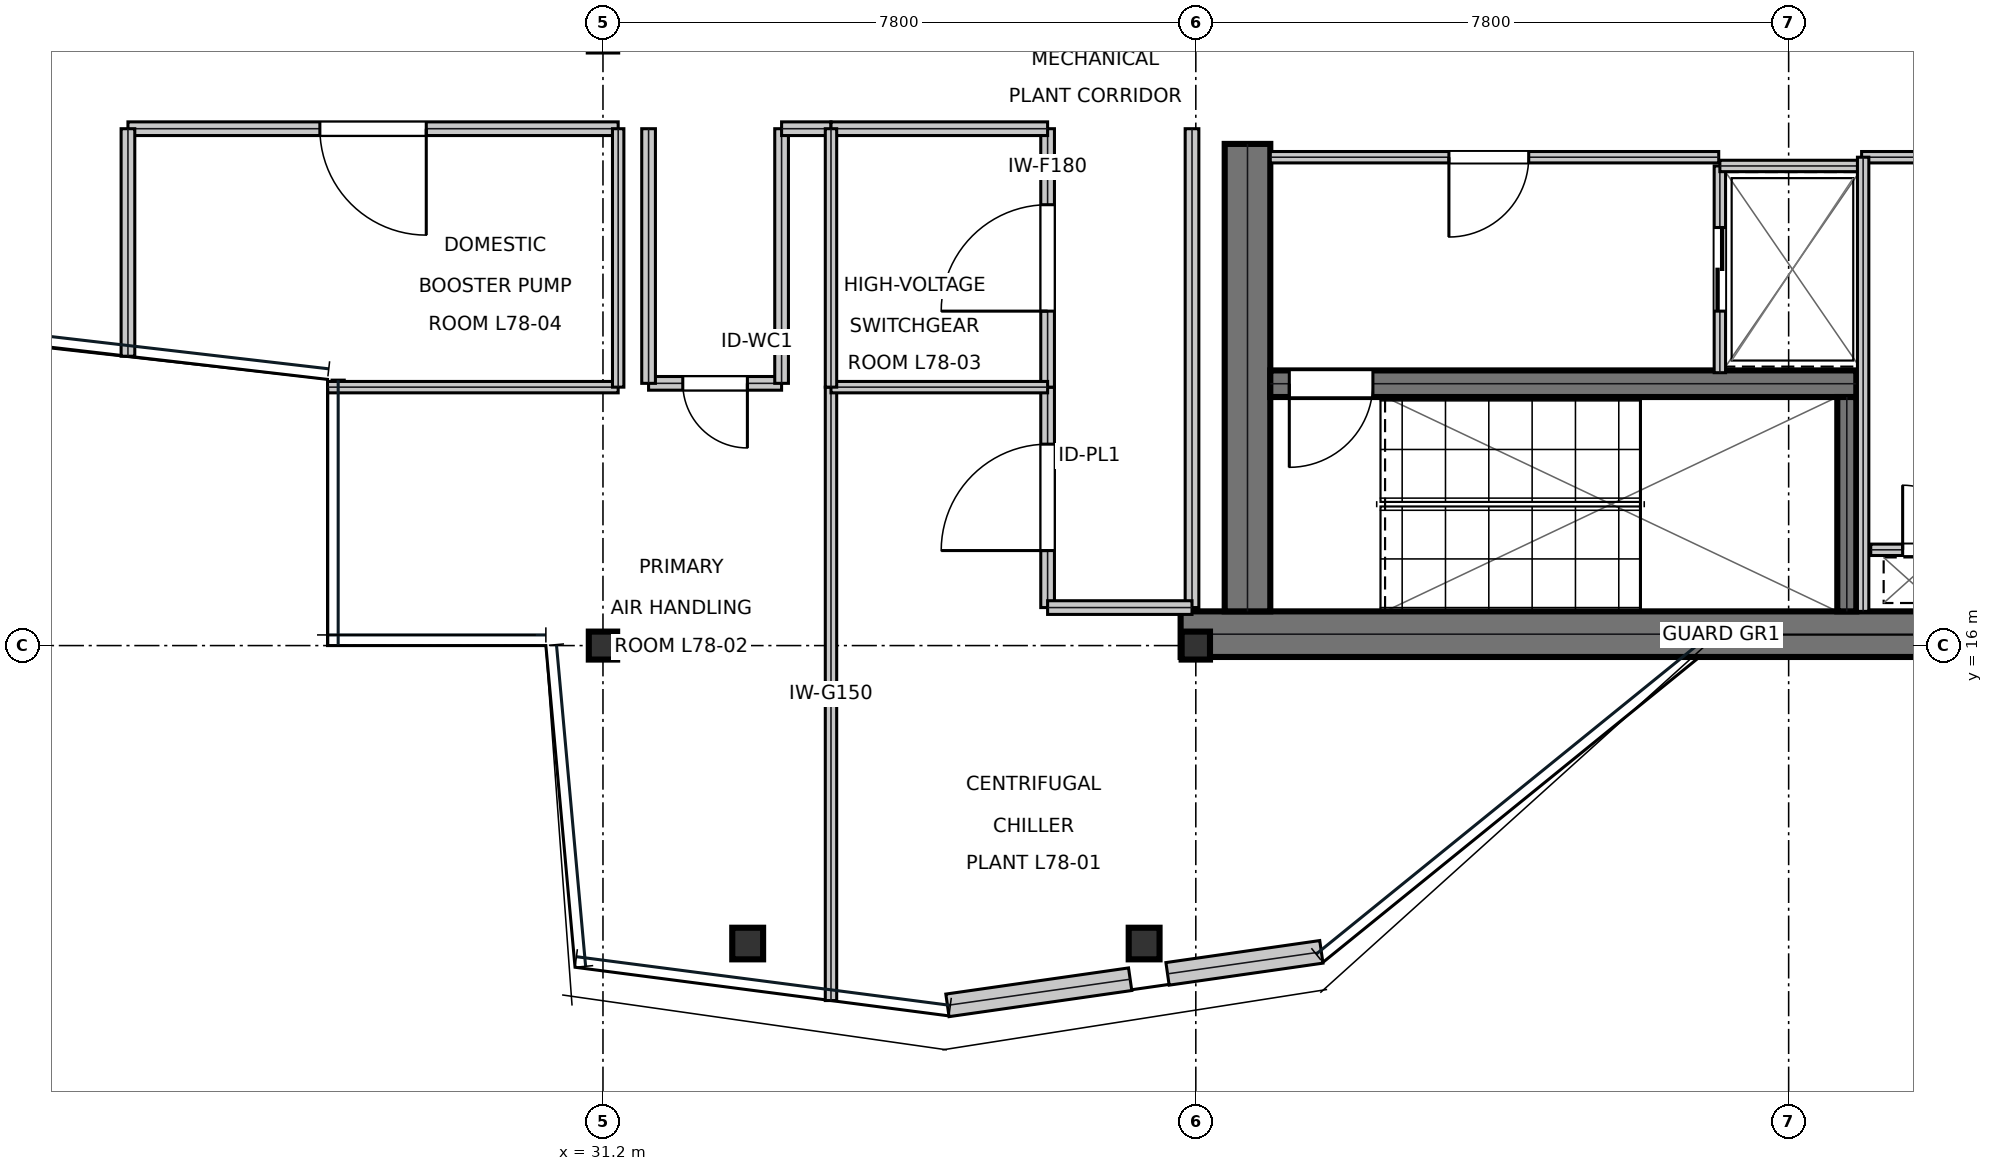
"""IFC4 building model, lengths in metres.
Left out: names, types, materials, properties, quantities, classifications, styles, units other than length and angle.
Written with IfcOpenShell. Run it as: python <this file> out.ifc"""

import sys

from ifc_helpers import new_model, si_unit, direction, frame, frame_2d, origin, origin_2d, place, context, subcontext, project, spatial, rectangle, i_section, extrude, element, fill, save


model = new_model("IFC4")
c1 = context("Model", 3, precision=1e-05, world=origin(), true_north=direction((0.0, 1.0)))
c2 = subcontext(c1, "Body", "Model", "MODEL_VIEW")
j1 = project(units=[si_unit("LENGTHUNIT", "METRE"), si_unit("PLANEANGLEUNIT", "RADIAN")], contexts=[c1])
p1 = place(None, origin())
s1 = spatial("IfcSite", under=j1, at=p1, CompositionType="ELEMENT")
p2 = place(p1, origin())
s2 = spatial("IfcBuilding", under=s1, at=p2, CompositionType="ELEMENT")
p3 = place(p2, frame((0.0, 0.0, 332.4)))
s3 = spatial("IfcBuildingStorey", under=s2, at=p3, CompositionType="ELEMENT", Elevation=332.4)
p4 = place(p3, frame((38.8, 16.15, 0.0), z_axis=(0.0, 0.0, 1.0), x_axis=(1.0, 0.0, 0.0)))
e1 = element("IfcWall", 1, at=p4, inside=s3, PredefinedType="SHEAR", context=c2, shape_type="SweptSolid", body=[
    extrude(rectangle(XDim=16.0, YDim=0.6, at=frame_2d((8.0, 0.0))), origin(), (0.0, 0.0, 1.0), 4.18),
])
p5 = place(p3, frame((39.68, 16.45, 0.0), z_axis=(0.0, 0.0, 1.0), x_axis=(0.0, 1.0, 0.0)))
e2 = element("IfcWall", 2, at=p5, inside=s3, PredefinedType="SHEAR", context=c2, shape_type="SweptSolid", body=[
    extrude(rectangle(XDim=6.15, YDim=0.6, at=frame_2d((3.075, 0.0))), origin(), (0.0, 0.0, 1.0), 4.18),
])
p6 = place(p3, frame((39.98, 19.445, 0.0), z_axis=(0.0, 0.0, 1.0), x_axis=(1.0, 0.0, 0.0)))
e3 = element("IfcWall", 3, at=p6, inside=s3, PredefinedType="SHEAR", context=c2, shape_type="SweptSolid", body=[
    extrude(rectangle(XDim=7.71, YDim=0.35, at=frame_2d((3.855, 0.0))), origin(), (0.0, 0.0, 1.0), 4.18),
])
p7 = place(p6, frame((0.25, 0.0, 0.0)))
e4 = element("IfcOpeningElement", 4, at=p7, cuts=e3, PredefinedType="OPENING", context=c2, shape_type="SweptSolid", body=[
    extrude(rectangle(XDim=1.1, YDim=2.15, at=frame_2d((0.55, 1.075))), frame((0.0, 0.185, 0.0), z_axis=(0.0, -1.0, 0.0), x_axis=(1.0, 0.0, 0.0)), (0.0, 0.0, 1.0), 0.37),
])
p8 = place(p3, frame((47.565, 16.45, 0.0), z_axis=(0.0, 0.0, 1.0), x_axis=(0.0, 1.0, 0.0)))
e5 = element("IfcWall", 5, at=p8, inside=s3, PredefinedType="SHEAR", context=c2, shape_type="SweptSolid", body=[
    extrude(rectangle(XDim=2.82, YDim=0.25, at=frame_2d((1.41, 0.0))), origin(), (0.0, 0.0, 1.0), 4.18),
])
for number, where, z_axis, x_axis in (
    (6, (31.2, 16.0, 0.0), (0.0, 0.0, 1.0), (1.0, 0.0, 0.0)),
    (7, (39.0, 16.0, 0.0), (0.0, 0.0, 1.0), (1.0, 0.0, 0.0)),
):
    element("IfcColumn", number, at=place(p3, frame(where, z_axis=z_axis, x_axis=x_axis)), inside=s3, PredefinedType="COLUMN", context=c2, shape_type="SweptSolid", body=[
        extrude(i_section(OverallWidth=0.373, OverallDepth=0.368, WebThickness=0.015, FlangeThickness=0.024, at=origin_2d()), origin(), (0.0, 0.0, 1.0), 4.494),
    ])
for number, where, z_axis, x_axis in (
    (8, (33.104, 12.08, 0.016), (0.0, 0.0, 1.0), (1.0, 0.0, 0.0)),
    (9, (38.32, 12.08, 0.016), (0.0, 0.0, 1.0), (1.0, 0.0, 0.0)),
):
    element("IfcColumn", number, at=place(p3, frame(where, z_axis=z_axis, x_axis=x_axis)), inside=s3, PredefinedType="COLUMN", context=c2, shape_type="SweptSolid", body=[
        extrude(i_section(OverallWidth=0.406, OverallDepth=0.416, WebThickness=0.03, FlangeThickness=0.048, at=origin_2d()), origin(), (0.0, 0.0, 1.0), 4.468),
    ])
p9 = place(p3, frame((35.732, 11.267, 0.0), z_axis=(0.0, 0.0, 1.0), x_axis=(0.989917298502, 0.141646539412, 0.0)))
e10 = element("IfcWall", 10, at=p9, inside=s3, PredefinedType="STANDARD", context=c2, shape_type="SweptSolid", body=[
    extrude(rectangle(XDim=2.428, YDim=0.3, at=frame_2d((1.214, 0.0))), origin(), (0.0, 0.0, 1.0), 4.18),
])
p10 = place(p3, frame((38.628, 11.681, 0.0), z_axis=(0.0, 0.0, 1.0), x_axis=(0.989904067126, 0.141738978007, 0.0)))
e11 = element("IfcWall", 11, at=p10, inside=s3, PredefinedType="STANDARD", context=c2, shape_type="SweptSolid", body=[
    extrude(rectangle(XDim=2.045, YDim=0.3, at=frame_2d((1.022, 0.0))), origin(), (0.0, 0.0, 1.0), 4.18),
])
p11 = place(p3, frame((39.98, 22.425, 0.0), z_axis=(0.0, 0.0, 1.0), x_axis=(1.0, 0.0, 0.0)))
e12 = element("IfcWall", 12, at=p11, inside=s3, PredefinedType="PARTITIONING", context=c2, shape_type="SweptSolid", body=[
    extrude(rectangle(XDim=5.9, YDim=0.15, at=frame_2d((2.95, 0.0))), origin(), (0.0, 0.0, 1.0), 4.18),
])
p12 = place(p11, frame((2.35, 0.0, 0.0)))
e13 = element("IfcOpeningElement", 13, at=p12, cuts=e12, PredefinedType="OPENING", context=c2, shape_type="SweptSolid", body=[
    extrude(rectangle(XDim=1.05, YDim=2.15, at=frame_2d((0.525, 1.075))), frame((0.0, 0.085, 0.0), z_axis=(0.0, -1.0, 0.0), x_axis=(1.0, 0.0, 0.0)), (0.0, 0.0, 1.0), 0.17),
])
p13 = place(p3, frame((45.895, 19.59, 0.0), z_axis=(0.0, 0.0, 1.0), x_axis=(0.0, 1.0, 0.0)))
e14 = element("IfcWall", 14, at=p13, inside=s3, PredefinedType="PARTITIONING", context=c2, shape_type="SweptSolid", body=[
    extrude(rectangle(XDim=2.72, YDim=0.15, at=frame_2d((1.36, 0.0))), origin(), (0.0, 0.0, 1.0), 4.18),
])
p14 = place(p13, frame((0.81, 0.0, 0.0)))
e15 = element("IfcOpeningElement", 15, at=p14, cuts=e14, PredefinedType="OPENING", context=c2, shape_type="SweptSolid", body=[
    extrude(rectangle(XDim=1.1, YDim=2.15, at=frame_2d((0.55, 1.075))), frame((0.0, 0.085, 0.0), z_axis=(0.0, -1.0, 0.0), x_axis=(1.0, 0.0, 0.0)), (0.0, 0.0, 1.0), 0.17),
])
p15 = place(p3, frame((45.895, 22.31, 0.0), z_axis=(0.0, 0.0, 1.0), x_axis=(1.0, 0.0, 0.0)))
e16 = element("IfcWall", 16, at=p15, inside=s3, PredefinedType="PARTITIONING", context=c2, shape_type="SweptSolid", body=[
    extrude(rectangle(XDim=1.915, YDim=0.15, at=frame_2d((0.958, 0.0))), origin(), (0.0, 0.0, 1.0), 4.18),
])
p16 = place(p3, frame((47.88, 17.26, 0.0), z_axis=(0.0, 0.0, 1.0), x_axis=(1.0, 0.0, 0.0)))
e17 = element("IfcWall", 17, at=p16, inside=s3, PredefinedType="PARTITIONING", context=c2, shape_type="SweptSolid", body=[
    extrude(rectangle(XDim=1.72, YDim=0.15, at=frame_2d((0.86, 0.0))), origin(), (0.0, 0.0, 1.0), 4.18),
])
p17 = place(p16, frame((0.42, 0.0, 0.0)))
e18 = element("IfcOpeningElement", 18, at=p17, cuts=e17, PredefinedType="OPENING", context=c2, shape_type="SweptSolid", body=[
    extrude(rectangle(XDim=0.85, YDim=2.15, at=frame_2d((0.425, 1.075))), frame((0.0, 0.085, 0.0), z_axis=(0.0, -1.0, 0.0), x_axis=(1.0, 0.0, 0.0)), (0.0, 0.0, 1.0), 0.17),
])
p18 = place(p3, frame((47.76, 22.425, 0.0), z_axis=(0.0, 0.0, 1.0), x_axis=(1.0, 0.0, 0.0)))
e19 = element("IfcWall", 19, at=p18, inside=s3, PredefinedType="PARTITIONING", context=c2, shape_type="SweptSolid", body=[
    extrude(rectangle(XDim=1.96, YDim=0.15, at=frame_2d((0.98, 0.0))), origin(), (0.0, 0.0, 1.0), 4.18),
])
p19 = place(p3, frame((47.78, 16.45, 0.0), z_axis=(0.0, 0.0, 1.0), x_axis=(0.0, 1.0, 0.0)))
e20 = element("IfcWall", 20, at=p19, inside=s3, PredefinedType="PARTITIONING", context=c2, shape_type="SweptSolid", body=[
    extrude(rectangle(XDim=5.975, YDim=0.15, at=frame_2d((2.988, 0.0))), origin(), (0.0, 0.0, 1.0), 4.18),
])
p20 = place(p3, frame((37.05, 16.5, 0.0), z_axis=(0.0, 0.0, 1.0), x_axis=(0.0, 1.0, 0.0)))
e21 = element("IfcWall", 21, at=p20, inside=s3, PredefinedType="SOLIDWALL", context=c2, shape_type="SweptSolid", body=[
    extrude(rectangle(XDim=2.9, YDim=0.18, at=frame_2d((1.45, 0.0))), origin(), (0.0, 0.0, 1.0), 3.91),
])
p21 = place(p20, frame((0.75, 0.0, 0.0)))
e22 = element("IfcOpeningElement", 22, at=p21, cuts=e21, PredefinedType="OPENING", context=c2, shape_type="SweptSolid", body=[
    extrude(rectangle(XDim=1.4, YDim=2.2, at=frame_2d((0.7, 1.1))), frame((0.0, 0.1, 0.0), z_axis=(0.0, -1.0, 0.0), x_axis=(1.0, 0.0, 0.0)), (0.0, 0.0, 1.0), 0.2),
])
p22 = place(p3, frame((31.8, 19.45, 0.0), z_axis=(0.0, 0.0, 1.0), x_axis=(1.0, 0.0, 0.0)))
e23 = element("IfcWall", 23, at=p22, inside=s3, PredefinedType="SOLIDWALL", context=c2, shape_type="SweptSolid", body=[
    extrude(rectangle(XDim=1.75, YDim=0.18, at=frame_2d((0.875, 0.0))), origin(), (0.0, 0.0, 1.0), 4.18),
])
p23 = place(p22, frame((0.45, 0.0, 0.0)))
e24 = element("IfcOpeningElement", 24, at=p23, cuts=e23, PredefinedType="OPENING", context=c2, shape_type="SweptSolid", body=[
    extrude(rectangle(XDim=0.85, YDim=2.15, at=frame_2d((0.425, 1.075))), frame((0.0, 0.1, 0.0), z_axis=(0.0, -1.0, 0.0), x_axis=(1.0, 0.0, 0.0)), (0.0, 0.0, 1.0), 0.2),
])
p24 = place(p3, frame((37.05, 19.4, 0.0), z_axis=(0.0, 0.0, 1.0), x_axis=(0.0, 1.0, 0.0)))
e25 = element("IfcWall", 25, at=p24, inside=s3, PredefinedType="SOLIDWALL", context=c2, shape_type="SweptSolid", body=[
    extrude(rectangle(XDim=3.4, YDim=0.18, at=frame_2d((1.7, 0.0))), origin(), (0.0, 0.0, 1.0), 3.91),
])
p25 = place(p24, frame((1.0, 0.0, 0.0)))
e26 = element("IfcOpeningElement", 26, at=p25, cuts=e25, PredefinedType="OPENING", context=c2, shape_type="SweptSolid", body=[
    extrude(rectangle(XDim=1.4, YDim=2.2, at=frame_2d((0.7, 1.1))), frame((0.0, 0.1, 0.0), z_axis=(0.0, -1.0, 0.0), x_axis=(1.0, 0.0, 0.0)), (0.0, 0.0, 1.0), 0.2),
])
p26 = place(p3, frame((24.95, 22.8, 0.0), z_axis=(0.0, 0.0, 1.0), x_axis=(1.0, 0.0, 0.0)))
e27 = element("IfcWall", 27, at=p26, inside=s3, PredefinedType="SOLIDWALL", context=c2, shape_type="SweptSolid", body=[
    extrude(rectangle(XDim=6.45, YDim=0.18, at=frame_2d((3.225, 0.0))), origin(), (0.0, 0.0, 1.0), 3.64),
])
p27 = place(p26, frame((2.525, 0.0, 0.0)))
e28 = element("IfcOpeningElement", 28, at=p27, cuts=e27, PredefinedType="OPENING", context=c2, shape_type="SweptSolid", body=[
    extrude(rectangle(XDim=1.4, YDim=2.2, at=frame_2d((0.7, 1.1))), frame((0.0, 0.1, 0.0), z_axis=(0.0, -1.0, 0.0), x_axis=(1.0, 0.0, 0.0)), (0.0, 0.0, 1.0), 0.2),
])
p28 = place(p3, frame((38.95, 16.5, 0.0), z_axis=(0.0, 0.0, 1.0), x_axis=(0.0, 1.0, 0.0)))
e29 = element("IfcWall", 29, at=p28, inside=s3, PredefinedType="SOLIDWALL", context=c2, shape_type="SweptSolid", body=[
    extrude(rectangle(XDim=6.3, YDim=0.18, at=frame_2d((3.15, 0.0))), origin(), (0.0, 0.0, 1.0), 3.91),
])
p29 = place(p3, frame((37.05, 16.5, 0.0), z_axis=(0.0, 0.0, 1.0), x_axis=(1.0, 0.0, 0.0)))
e30 = element("IfcWall", 30, at=p29, inside=s3, PredefinedType="SOLIDWALL", context=c2, shape_type="SweptSolid", body=[
    extrude(rectangle(XDim=1.9, YDim=0.18, at=frame_2d((0.95, 0.0))), origin(), (0.0, 0.0, 1.0), 4.18),
])
for number, where, z_axis, x_axis in (
    (31, (33.55, 19.45, 0.0), (0.0, 0.0, 1.0), (0.0, 1.0, 0.0)),
    (32, (31.8, 19.45, 0.0), (0.0, 0.0, 1.0), (0.0, 1.0, 0.0)),
):
    element("IfcWall", number, at=place(p3, frame(where, z_axis=z_axis, x_axis=x_axis)), inside=s3, PredefinedType="SOLIDWALL", context=c2, shape_type="SweptSolid", body=[
        extrude(rectangle(XDim=3.35, YDim=0.18, at=frame_2d((1.675, 0.0))), origin(), (0.0, 0.0, 1.0), 3.91),
    ])
p30 = place(p3, frame((33.55, 22.8, 0.0), z_axis=(0.0, 0.0, 1.0), x_axis=(1.0, 0.0, 0.0)))
e33 = element("IfcWall", 33, at=p30, inside=s3, PredefinedType="SOLIDWALL", context=c2, shape_type="SweptSolid", body=[
    extrude(rectangle(XDim=0.65, YDim=0.18, at=frame_2d((0.325, 0.0))), origin(), (0.0, 0.0, 1.0), 4.18),
])
p31 = place(p3, frame((34.2, 22.8, 0.0), z_axis=(0.0, 0.0, 1.0), x_axis=(1.0, 0.0, 0.0)))
e34 = element("IfcWall", 34, at=p31, inside=s3, PredefinedType="SOLIDWALL", context=c2, shape_type="SweptSolid", body=[
    extrude(rectangle(XDim=2.85, YDim=0.18, at=frame_2d((1.425, 0.0))), origin(), (0.0, 0.0, 1.0), 4.18),
])
p32 = place(p3, frame((24.95, 19.807, 0.0), z_axis=(0.0, 0.0, 1.0), x_axis=(0.0, 1.0, 0.0)))
e35 = element("IfcWall", 35, at=p32, inside=s3, PredefinedType="SOLIDWALL", context=c2, shape_type="SweptSolid", body=[
    extrude(rectangle(XDim=2.993, YDim=0.18, at=frame_2d((1.497, 0.0))), origin(), (0.0, 0.0, 1.0), 3.64),
])
p33 = place(p3, frame((34.2, 11.33, 0.0), z_axis=(0.0, 0.0, 1.0), x_axis=(0.0, 1.0, 0.0)))
e36 = element("IfcWall", 36, at=p33, inside=s3, PredefinedType="MOVABLE", context=c2, shape_type="SweptSolid", body=[
    extrude(rectangle(XDim=8.07, YDim=0.15, at=frame_2d((4.035, 0.0))), origin(), (0.0, 0.0, 1.0), 3.64),
])
p34 = place(p3, frame((34.2, 19.4, 0.0), z_axis=(0.0, 0.0, 1.0), x_axis=(1.0, 0.0, 0.0)))
e37 = element("IfcWall", 37, at=p34, inside=s3, PredefinedType="MOVABLE", context=c2, shape_type="SweptSolid", body=[
    extrude(rectangle(XDim=2.85, YDim=0.15, at=frame_2d((1.425, 0.0))), origin(), (0.0, 0.0, 1.0), 4.18),
])
p35 = place(p3, frame((34.2, 19.4, 0.0), z_axis=(0.0, 0.0, 1.0), x_axis=(0.0, 1.0, 0.0)))
e38 = element("IfcWall", 38, at=p35, inside=s3, PredefinedType="MOVABLE", context=c2, shape_type="SweptSolid", body=[
    extrude(rectangle(XDim=3.4, YDim=0.15, at=frame_2d((1.7, 0.0))), origin(), (0.0, 0.0, 1.0), 3.91),
])
p36 = place(p3, frame((27.576, 19.4, 0.0), z_axis=(0.0, 0.0, 1.0), x_axis=(1.0, 0.0, 0.0)))
e39 = element("IfcWall", 39, at=p36, inside=s3, PredefinedType="MOVABLE", context=c2, shape_type="SweptSolid", body=[
    extrude(rectangle(XDim=3.824, YDim=0.15, at=frame_2d((1.912, 0.0))), origin(), (0.0, 0.0, 1.0), 3.64),
])
p37 = place(p3, frame((31.4, 19.4, 0.0), z_axis=(0.0, 0.0, 1.0), x_axis=(0.0, 1.0, 0.0)))
e40 = element("IfcWall", 40, at=p37, inside=s3, PredefinedType="MOVABLE", context=c2, shape_type="SweptSolid", body=[
    extrude(rectangle(XDim=3.4, YDim=0.15, at=frame_2d((1.7, 0.0))), origin(), (0.0, 0.0, 1.0), 3.64),
])
p38 = place(p12, frame((1.05, 0.0, 0.0), z_axis=(0.0, 0.0, 1.0), x_axis=(-1.0, 0.0, 0.0)))
e41 = element("IfcDoor", 41, at=p38, inside=s3, OperationType="SINGLE_SWING_RIGHT", PredefinedType="DOOR", context=c2, shape_type="SweptSolid", body=[
    extrude(rectangle(XDim=1.05, YDim=2.15, at=frame_2d((0.525, 1.075))), frame((0.0, 0.025, 0.0), z_axis=(0.0, -1.0, 0.0), x_axis=(1.0, 0.0, 0.0)), (0.0, 0.0, 1.0), 0.05),
])
fill(e13, e41)
p39 = place(p14, frame((1.1, 0.0, 0.0), z_axis=(0.0, 0.0, 1.0), x_axis=(-1.0, 0.0, 0.0)))
e42 = element("IfcDoor", 42, at=p39, inside=s3, OperationType="DOUBLE_DOOR_SLIDING", PredefinedType="DOOR", context=c2, shape_type="SweptSolid", body=[
    extrude(rectangle(XDim=1.1, YDim=2.15, at=frame_2d((0.55, 1.075))), frame((0.0, 0.025, 0.0), z_axis=(0.0, -1.0, 0.0), x_axis=(1.0, 0.0, 0.0)), (0.0, 0.0, 1.0), 0.05),
])
fill(e15, e42)
p40 = place(p17, origin())
e43 = element("IfcDoor", 43, at=p40, inside=s3, OperationType="SINGLE_SWING_LEFT", PredefinedType="TRAPDOOR", context=c2, shape_type="SweptSolid", body=[
    extrude(rectangle(XDim=0.85, YDim=2.15, at=frame_2d((0.425, 1.075))), frame((0.0, 0.025, 0.0), z_axis=(0.0, -1.0, 0.0), x_axis=(1.0, 0.0, 0.0)), (0.0, 0.0, 1.0), 0.05),
])
fill(e18, e43)
p41 = place(p21, origin())
e44 = element("IfcDoor", 44, at=p41, inside=s3, OperationType="SINGLE_SWING_LEFT", PredefinedType="DOOR", context=c2, shape_type="SweptSolid", body=[
    extrude(rectangle(XDim=1.4, YDim=2.2, at=frame_2d((0.7, 1.1))), frame((0.0, 0.025, 0.0), z_axis=(0.0, -1.0, 0.0), x_axis=(1.0, 0.0, 0.0)), (0.0, 0.0, 1.0), 0.05),
])
fill(e22, e44)
p42 = place(p23, frame((0.85, 0.0, 0.0), z_axis=(0.0, 0.0, 1.0), x_axis=(-1.0, 0.0, 0.0)))
e45 = element("IfcDoor", 45, at=p42, inside=s3, OperationType="SINGLE_SWING_LEFT", PredefinedType="DOOR", context=c2, shape_type="SweptSolid", body=[
    extrude(rectangle(XDim=0.85, YDim=2.15, at=frame_2d((0.425, 1.075))), frame((0.0, 0.025, 0.0), z_axis=(0.0, -1.0, 0.0), x_axis=(1.0, 0.0, 0.0)), (0.0, 0.0, 1.0), 0.05),
])
fill(e24, e45)
p43 = place(p25, origin())
e46 = element("IfcDoor", 46, at=p43, inside=s3, OperationType="SINGLE_SWING_LEFT", PredefinedType="DOOR", context=c2, shape_type="SweptSolid", body=[
    extrude(rectangle(XDim=1.4, YDim=2.2, at=frame_2d((0.7, 1.1))), frame((0.0, 0.025, 0.0), z_axis=(0.0, -1.0, 0.0), x_axis=(1.0, 0.0, 0.0)), (0.0, 0.0, 1.0), 0.05),
])
fill(e26, e46)
p44 = place(p27, frame((1.4, 0.0, 0.0), z_axis=(0.0, 0.0, 1.0), x_axis=(-1.0, 0.0, 0.0)))
e47 = element("IfcDoor", 47, at=p44, inside=s3, OperationType="SINGLE_SWING_LEFT", PredefinedType="DOOR", context=c2, shape_type="SweptSolid", body=[
    extrude(rectangle(XDim=1.4, YDim=2.2, at=frame_2d((0.7, 1.1))), frame((0.0, 0.025, 0.0), z_axis=(0.0, -1.0, 0.0), x_axis=(1.0, 0.0, 0.0)), (0.0, 0.0, 1.0), 0.05),
])
fill(e28, e47)
p45 = place(p7, frame((1.1, 0.0, 0.0), z_axis=(0.0, 0.0, 1.0), x_axis=(-1.0, 0.0, 0.0)))
e48 = element("IfcDoor", 48, at=p45, inside=s3, OperationType="SINGLE_SWING_RIGHT", PredefinedType="DOOR", context=c2, shape_type="SweptSolid", body=[
    extrude(rectangle(XDim=1.1, YDim=2.15, at=frame_2d((0.55, 1.075))), frame((0.0, 0.025, 0.0), z_axis=(0.0, -1.0, 0.0), x_axis=(1.0, 0.0, 0.0)), (0.0, 0.0, 1.0), 0.05),
])
fill(e4, e48)
save(model, sys.argv[1])
